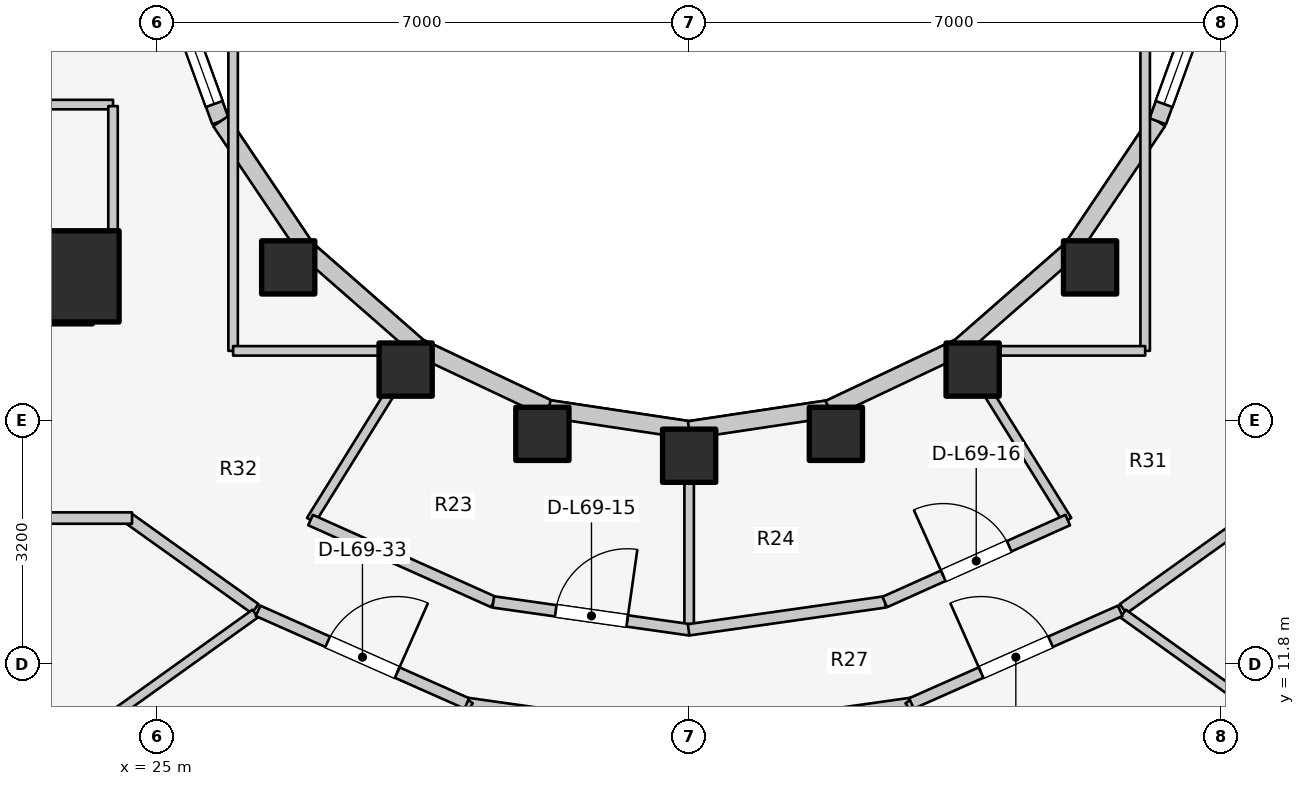
"""IFC4 building model, lengths in metres.
Left out: names, types, materials, properties, quantities, classifications, styles, units other than length and angle.
Written with IfcOpenShell. Run it as: python <this file> out.ifc"""

import sys

from ifc_helpers import new_model, si_unit, direction, frame, frame_2d, origin, origin_2d, place, context, subcontext, project, spatial, rectangle, extrude, element, fill, save


model = new_model("IFC4")
c1 = context("Model", 3, precision=1e-05, world=origin(), true_north=direction((0.0, 1.0)))
c2 = subcontext(c1, "Body", "Model", "MODEL_VIEW")
j1 = project(units=[si_unit("LENGTHUNIT", "METRE"), si_unit("PLANEANGLEUNIT", "RADIAN")], contexts=[c1])
p1 = place(None, origin())
s1 = spatial("IfcSite", under=j1, at=p1, CompositionType="ELEMENT")
p2 = place(p1, origin())
s2 = spatial("IfcBuilding", under=s1, at=p2, CompositionType="ELEMENT")
p3 = place(p2, frame((0.0, 0.0, 226.4)))
s3 = spatial("IfcBuildingStorey", under=s2, at=p3, CompositionType="ELEMENT", Elevation=226.4)
p4 = place(p3, frame((19.65, 16.55, 0.0), z_axis=(0.0, 0.0, 1.0), x_axis=(1.0, 0.0, 0.0)))
e1 = element("IfcWall", 1, at=p4, inside=s3, PredefinedType="SHEAR", context=c2, shape_type="SweptSolid", body=[
    extrude(rectangle(XDim=4.5, YDim=0.55, at=frame_2d((2.25, 0.0))), origin(), (0.0, 0.0, 1.0), 3.1),
])
p5 = place(p3, frame((23.9, 16.9, 0.0), z_axis=(0.0, 0.0, 1.0), x_axis=(1.0, 0.0, 0.0)))
e2 = element("IfcColumn", 2, at=p5, inside=s3, PredefinedType="COLUMN", context=c2, shape_type="SweptSolid", body=[
    extrude(rectangle(XDim=1.2, YDim=1.2, at=origin_2d()), origin(), (0.0, 0.0, 1.0), 3.1),
])
for number, where, z_axis, x_axis in (
    (3, (26.725, 17.018, 0.0), (0.0, 0.0, 1.0), (1.0, 0.0, 0.0)),
    (4, (28.27, 15.673, 0.0), (0.0, 0.0, 1.0), (1.0, 0.0, 0.0)),
    (5, (30.069, 14.828, 0.0), (0.0, 0.0, 1.0), (1.0, 0.0, 0.0)),
    (6, (32.0, 14.54, 0.0), (0.0, 0.0, 1.0), (1.0, 0.0, 0.0)),
    (7, (33.931, 14.828, 0.0), (0.0, 0.0, 1.0), (1.0, 0.0, 0.0)),
    (8, (35.73, 15.673, 0.0), (0.0, 0.0, 1.0), (1.0, 0.0, 0.0)),
    (9, (37.275, 17.018, 0.0), (0.0, 0.0, 1.0), (1.0, 0.0, 0.0)),
):
    element("IfcColumn", number, at=place(p3, frame(where, z_axis=z_axis, x_axis=x_axis)), inside=s3, PredefinedType="COLUMN", context=c2, shape_type="SweptSolid", body=[
        extrude(rectangle(XDim=0.7, YDim=0.7, at=origin_2d()), origin(), (0.0, 0.0, 1.0), 3.1),
    ])
p6 = place(p3, frame((25.123, 20.898, 0.0), z_axis=(0.0, 0.0, 1.0), x_axis=(0.341423187295, -0.93990968033, 0.0)))
e10 = element("IfcWall", 10, at=p6, inside=s3, PredefinedType="STANDARD", context=c2, shape_type="SweptSolid", body=[
    extrude(rectangle(XDim=2.084, YDim=0.23, at=frame_2d((1.042, 0.0))), origin(), (0.0, 0.0, 1.0), 2.84),
])
p7 = place(p6, frame((0.242, 0.0, 0.85)))
e11 = element("IfcOpeningElement", 11, at=p7, cuts=e10, PredefinedType="OPENING", context=c2, shape_type="SweptSolid", body=[
    extrude(rectangle(XDim=1.6, YDim=1.65, at=frame_2d((0.8, 0.825))), frame((0.0, 0.125, 0.0), z_axis=(0.0, -1.0, 0.0), x_axis=(1.0, 0.0, 0.0)), (0.0, 0.0, 1.0), 0.25),
])
p8 = place(p3, frame((25.834, 18.94, 0.0), z_axis=(0.0, 0.0, 1.0), x_axis=(0.558197800898, -0.829707909492, 0.0)))
e12 = element("IfcWall", 12, at=p8, inside=s3, PredefinedType="STANDARD", context=c2, shape_type="SweptSolid", body=[
    extrude(rectangle(XDim=2.027, YDim=0.23, at=frame_2d((1.013, 0.0))), origin(), (0.0, 0.0, 1.0), 2.16),
])
p9 = place(p3, frame((26.965, 17.258, 0.0), z_axis=(0.0, 0.0, 1.0), x_axis=(0.752576694707, -0.658504607869, 0.0)))
e13 = element("IfcWall", 13, at=p9, inside=s3, PredefinedType="STANDARD", context=c2, shape_type="SweptSolid", body=[
    extrude(rectangle(XDim=1.959, YDim=0.23, at=frame_2d((0.98, 0.0))), origin(), (0.0, 0.0, 1.0), 2.16),
])
p10 = place(p3, frame((28.44, 15.968, 0.0), z_axis=(0.0, 0.0, 1.0), x_axis=(0.904179699603, -0.427152280606, 0.0)))
e14 = element("IfcWall", 14, at=p10, inside=s3, PredefinedType="STANDARD", context=c2, shape_type="SweptSolid", body=[
    extrude(rectangle(XDim=1.899, YDim=0.23, at=frame_2d((0.95, 0.0))), origin(), (0.0, 0.0, 1.0), 2.16),
])
for number, where, z_axis, x_axis in (
    (15, (30.157, 15.157, 0.0), (0.0, 0.0, 1.0), (0.989, -0.149, 0.0)),
    (16, (32.0, 14.88, 0.0), (0.0, 0.0, 1.0), (0.989, 0.149, 0.0)),
):
    element("IfcWall", number, at=place(p3, frame(where, z_axis=z_axis, x_axis=x_axis)), inside=s3, PredefinedType="STANDARD", context=c2, shape_type="SweptSolid", body=[
        extrude(rectangle(XDim=1.864, YDim=0.23, at=frame_2d((0.932, 0.0))), origin(), (0.0, 0.0, 1.0), 2.16),
    ])
p11 = place(p3, frame((33.843, 15.157, 0.0), z_axis=(0.0, 0.0, 1.0), x_axis=(0.904179699603, 0.427152280606, 0.0)))
e17 = element("IfcWall", 17, at=p11, inside=s3, PredefinedType="STANDARD", context=c2, shape_type="SweptSolid", body=[
    extrude(rectangle(XDim=1.899, YDim=0.23, at=frame_2d((0.95, 0.0))), origin(), (0.0, 0.0, 1.0), 2.16),
])
p12 = place(p3, frame((35.56, 15.968, 0.0), z_axis=(0.0, 0.0, 1.0), x_axis=(0.752576694707, 0.658504607869, 0.0)))
e18 = element("IfcWall", 18, at=p12, inside=s3, PredefinedType="STANDARD", context=c2, shape_type="SweptSolid", body=[
    extrude(rectangle(XDim=1.959, YDim=0.23, at=frame_2d((0.98, 0.0))), origin(), (0.0, 0.0, 1.0), 2.16),
])
p13 = place(p3, frame((37.035, 17.258, 0.0), z_axis=(0.0, 0.0, 1.0), x_axis=(0.558197800898, 0.829707909492, 0.0)))
e19 = element("IfcWall", 19, at=p13, inside=s3, PredefinedType="STANDARD", context=c2, shape_type="SweptSolid", body=[
    extrude(rectangle(XDim=2.027, YDim=0.23, at=frame_2d((1.013, 0.0))), origin(), (0.0, 0.0, 1.0), 2.16),
])
p14 = place(p3, frame((38.166, 18.94, 0.0), z_axis=(0.0, 0.0, 1.0), x_axis=(0.341423187295, 0.93990968033, 0.0)))
e20 = element("IfcWall", 20, at=p14, inside=s3, PredefinedType="STANDARD", context=c2, shape_type="SweptSolid", body=[
    extrude(rectangle(XDim=2.084, YDim=0.23, at=frame_2d((1.042, 0.0))), origin(), (0.0, 0.0, 1.0), 2.84),
])
p15 = place(p14, frame((0.242, 0.0, 0.85)))
e21 = element("IfcOpeningElement", 21, at=p15, cuts=e20, PredefinedType="OPENING", context=c2, shape_type="SweptSolid", body=[
    extrude(rectangle(XDim=1.6, YDim=1.65, at=frame_2d((0.8, 0.825))), frame((0.0, 0.125, 0.0), z_axis=(0.0, -1.0, 0.0), x_axis=(1.0, 0.0, 0.0)), (0.0, 0.0, 1.0), 0.25),
])
p16 = place(p3, frame((19.55, 19.16, 0.0), z_axis=(0.0, 0.0, 1.0), x_axis=(1.0, 0.0, 0.0)))
e22 = element("IfcWall", 22, at=p16, inside=s3, PredefinedType="PARTITIONING", context=c2, shape_type="SweptSolid", body=[
    extrude(rectangle(XDim=4.87, YDim=0.125, at=frame_2d((2.435, 0.0))), origin(), (0.0, 0.0, 1.0), 2.12),
])
p17 = place(p16, frame((2.272, 0.0, 0.0)))
e23 = element("IfcOpeningElement", 23, at=p17, cuts=e22, PredefinedType="OPENING", context=c2, shape_type="SweptSolid", body=[
    extrude(rectangle(XDim=0.85, YDim=2.05, at=frame_2d((0.425, 1.025))), frame((0.0, 0.073, 0.0), z_axis=(0.0, -1.0, 0.0), x_axis=(1.0, 0.0, 0.0)), (0.0, 0.0, 1.0), 0.145),
])
p18 = place(p3, frame((24.42, 17.1, 0.0), z_axis=(0.0, 0.0, 1.0), x_axis=(0.0, 1.0, 0.0)))
e24 = element("IfcWall", 24, at=p18, inside=s3, PredefinedType="PARTITIONING", context=c2, shape_type="SweptSolid", body=[
    extrude(rectangle(XDim=2.04, YDim=0.125, at=frame_2d((1.02, 0.0))), origin(), (0.0, 0.0, 1.0), 2.232),
])
p19 = place(p3, frame((28.45, 15.985, 0.0), z_axis=(0.0, 0.0, 1.0), x_axis=(-0.527527080983, -0.849538215049, 0.0)))
e25 = element("IfcWall", 25, at=p19, inside=s3, PredefinedType="PARTITIONING", context=c2, shape_type="SweptSolid", body=[
    extrude(rectangle(XDim=2.701, YDim=0.125, at=frame_2d((1.351, 0.0))), origin(), (0.0, 0.0, 1.0), 2.376),
])
p20 = place(p3, frame((32.0, 14.9, 0.0), z_axis=(0.0, 0.0, 1.0), x_axis=(0.0, -1.0, 0.0)))
e26 = element("IfcWall", 26, at=p20, inside=s3, PredefinedType="PARTITIONING", context=c2, shape_type="SweptSolid", body=[
    extrude(rectangle(XDim=2.65, YDim=0.125, at=frame_2d((1.325, 0.0))), origin(), (0.0, 0.0, 1.0), 2.376),
])
p21 = place(p3, frame((35.55, 15.985, 0.0), z_axis=(0.0, 0.0, 1.0), x_axis=(0.527527080983, -0.849538215049, 0.0)))
e27 = element("IfcWall", 27, at=p21, inside=s3, PredefinedType="PARTITIONING", context=c2, shape_type="SweptSolid", body=[
    extrude(rectangle(XDim=2.701, YDim=0.125, at=frame_2d((1.351, 0.0))), origin(), (0.0, 0.0, 1.0), 2.376),
])
p22 = place(p3, frame((27.019, 13.694, 0.0), z_axis=(0.0, 0.0, 1.0), x_axis=(0.912628408652, -0.408790151203, 0.0)))
e28 = element("IfcWall", 28, at=p22, inside=s3, PredefinedType="PARTITIONING", context=c2, shape_type="SweptSolid", body=[
    extrude(rectangle(XDim=2.638, YDim=0.15, at=frame_2d((1.319, 0.0))), origin(), (0.0, 0.0, 1.0), 2.376),
])
p23 = place(p3, frame((29.423, 12.617, 0.0), z_axis=(0.0, 0.0, 1.0), x_axis=(0.990078185178, -0.140517569133, 0.0)))
e29 = element("IfcWall", 29, at=p23, inside=s3, PredefinedType="PARTITIONING", context=c2, shape_type="SweptSolid", body=[
    extrude(rectangle(XDim=2.61, YDim=0.15, at=frame_2d((1.305, 0.0))), origin(), (0.0, 0.0, 1.0), 2.376),
])
p24 = place(p23, frame((0.83, 0.0, 0.0)))
e30 = element("IfcOpeningElement", 30, at=p24, cuts=e29, PredefinedType="OPENING", context=c2, shape_type="SweptSolid", body=[
    extrude(rectangle(XDim=0.95, YDim=2.1, at=frame_2d((0.475, 1.05))), frame((0.0, 0.085, 0.0), z_axis=(0.0, -1.0, 0.0), x_axis=(1.0, 0.0, 0.0)), (0.0, 0.0, 1.0), 0.17),
])
p25 = place(p3, frame((31.993, 12.25, 0.0), z_axis=(0.0, 0.0, 1.0), x_axis=(0.990078185178, 0.140517569133, 0.0)))
e31 = element("IfcWall", 31, at=p25, inside=s3, PredefinedType="PARTITIONING", context=c2, shape_type="SweptSolid", body=[
    extrude(rectangle(XDim=2.61, YDim=0.15, at=frame_2d((1.305, 0.0))), origin(), (0.0, 0.0, 1.0), 2.376),
])
p26 = place(p3, frame((34.573, 12.616, 0.0), z_axis=(0.0, 0.0, 1.0), x_axis=(0.912628408652, 0.408790151203, 0.0)))
e32 = element("IfcWall", 32, at=p26, inside=s3, PredefinedType="PARTITIONING", context=c2, shape_type="SweptSolid", body=[
    extrude(rectangle(XDim=2.638, YDim=0.15, at=frame_2d((1.319, 0.0))), origin(), (0.0, 0.0, 1.0), 2.376),
])
p27 = place(p26, frame((0.844, 0.0, 0.0)))
e33 = element("IfcOpeningElement", 33, at=p27, cuts=e32, PredefinedType="OPENING", context=c2, shape_type="SweptSolid", body=[
    extrude(rectangle(XDim=0.95, YDim=2.1, at=frame_2d((0.475, 1.05))), frame((0.0, 0.085, 0.0), z_axis=(0.0, -1.0, 0.0), x_axis=(1.0, 0.0, 0.0)), (0.0, 0.0, 1.0), 0.17),
])
p28 = place(p3, frame((26.0, 15.92, 0.0), z_axis=(0.0, 0.0, 1.0), x_axis=(0.0, 1.0, 0.0)))
e34 = element("IfcWall", 34, at=p28, inside=s3, PredefinedType="PARTITIONING", context=c2, shape_type="SweptSolid", body=[
    extrude(rectangle(XDim=4.28, YDim=0.125, at=frame_2d((2.14, 0.0))), origin(), (0.0, 0.0, 1.0), 2.232),
])
p29 = place(p3, frame((26.0, 15.92, 0.0), z_axis=(0.0, 0.0, 1.0), x_axis=(1.0, 0.0, 0.0)))
e35 = element("IfcWall", 35, at=p29, inside=s3, PredefinedType="PARTITIONING", context=c2, shape_type="SweptSolid", body=[
    extrude(rectangle(XDim=2.6, YDim=0.125, at=frame_2d((1.3, 0.0))), origin(), (0.0, 0.0, 1.0), 2.232),
])
p30 = place(p3, frame((38.0, 15.92, 0.0), z_axis=(0.0, 0.0, 1.0), x_axis=(0.0, 1.0, 0.0)))
e36 = element("IfcWall", 36, at=p30, inside=s3, PredefinedType="PARTITIONING", context=c2, shape_type="SweptSolid", body=[
    extrude(rectangle(XDim=4.28, YDim=0.125, at=frame_2d((2.14, 0.0))), origin(), (0.0, 0.0, 1.0), 2.232),
])
p31 = place(p3, frame((35.4, 15.92, 0.0), z_axis=(0.0, 0.0, 1.0), x_axis=(1.0, 0.0, 0.0)))
e37 = element("IfcWall", 37, at=p31, inside=s3, PredefinedType="PARTITIONING", context=c2, shape_type="SweptSolid", body=[
    extrude(rectangle(XDim=2.6, YDim=0.125, at=frame_2d((1.3, 0.0))), origin(), (0.0, 0.0, 1.0), 2.232),
])
p32 = place(p3, frame((26.29, 12.527, 0.0), z_axis=(0.0, 0.0, 1.0), x_axis=(-0.813780999276, 0.581171648669, 0.0)))
e38 = element("IfcWall", 38, at=p32, inside=s3, PredefinedType="PARTITIONING", context=c2, shape_type="SweptSolid", body=[
    extrude(rectangle(XDim=2.082, YDim=0.15, at=frame_2d((1.041, 0.0))), origin(), (0.0, 0.0, 1.0), 2.376),
])
p33 = place(p3, frame((17.15, 13.72, 0.0), z_axis=(0.0, 0.0, 1.0), x_axis=(1.0, 0.0, 0.0)))
e39 = element("IfcWall", 39, at=p33, inside=s3, PredefinedType="PARTITIONING", context=c2, shape_type="SweptSolid", body=[
    extrude(rectangle(XDim=7.52, YDim=0.15, at=frame_2d((3.76, 0.0))), origin(), (0.0, 0.0, 1.0), 2.376),
])
p34 = place(p33, frame((1.3, 0.0, 0.0)))
e40 = element("IfcOpeningElement", 40, at=p34, cuts=e39, PredefinedType="OPENING", context=c2, shape_type="SweptSolid", body=[
    extrude(rectangle(XDim=0.9, YDim=2.1, at=frame_2d((0.45, 1.05))), frame((0.0, 0.085, 0.0), z_axis=(0.0, -1.0, 0.0), x_axis=(1.0, 0.0, 0.0)), (0.0, 0.0, 1.0), 0.17),
])
p35 = place(p3, frame((37.71, 12.527, 0.0), z_axis=(0.0, 0.0, 1.0), x_axis=(0.813780999276, 0.581171648669, 0.0)))
e41 = element("IfcWall", 41, at=p35, inside=s3, PredefinedType="PARTITIONING", context=c2, shape_type="SweptSolid", body=[
    extrude(rectangle(XDim=2.082, YDim=0.15, at=frame_2d((1.041, 0.0))), origin(), (0.0, 0.0, 1.0), 2.376),
])
for number, where, z_axis, x_axis in (
    (42, (26.29, 12.463, 0.0), (0.0, 0.0, 1.0), (-0.813, -0.582, 0.0)),
    (43, (37.71, 12.463, 0.0), (0.0, 0.0, 1.0), (0.813, -0.582, 0.0)),
):
    element("IfcWall", number, at=place(p3, frame(where, z_axis=z_axis, x_axis=x_axis)), inside=s3, PredefinedType="PARTITIONING", context=c2, shape_type="SweptSolid", body=[
        extrude(rectangle(XDim=6.955, YDim=0.125, at=frame_2d((3.477, 0.0))), origin(), (0.0, 0.0, 1.0), 2.376),
    ])
p36 = place(p3, frame((29.018, 11.29, 0.0), z_axis=(0.0, 0.0, 1.0), x_axis=(0.990214091671, -0.13955662885, 0.0)))
e44 = element("IfcWall", 44, at=p36, inside=s3, PredefinedType="PARTITIONING", context=c2, shape_type="SweptSolid", body=[
    extrude(rectangle(XDim=3.062, YDim=0.15, at=frame_2d((1.531, 0.0))), origin(), (0.0, 0.0, 1.0), 2.376),
])
p37 = place(p3, frame((29.097, 11.324, 0.0), z_axis=(0.0, 0.0, 1.0), x_axis=(-0.583259891741, -0.812285601673, 0.0)))
e45 = element("IfcWall", 45, at=p37, inside=s3, PredefinedType="PLUMBINGWALL", context=c2, shape_type="SweptSolid", body=[
    extrude(rectangle(XDim=2.1, YDim=0.14, at=frame_2d((1.05, 0.0))), origin(), (0.0, 0.0, 1.0), 2.385),
])
p38 = place(p3, frame((26.328, 12.499, 0.0), z_axis=(0.0, 0.0, 1.0), x_axis=(0.914139569865, -0.405399613724, 0.0)))
e46 = element("IfcWall", 46, at=p38, inside=s3, PredefinedType="PARTITIONING", context=c2, shape_type="SweptSolid", body=[
    extrude(rectangle(XDim=3.005, YDim=0.15, at=frame_2d((1.502, 0.0))), origin(), (0.0, 0.0, 1.0), 2.376),
])
p39 = place(p38, frame((1.002, 0.0, 0.0)))
e47 = element("IfcOpeningElement", 47, at=p39, cuts=e46, PredefinedType="OPENING", context=c2, shape_type="SweptSolid", body=[
    extrude(rectangle(XDim=1.0, YDim=2.1, at=frame_2d((0.5, 1.05))), frame((0.0, 0.085, 0.0), z_axis=(0.0, -1.0, 0.0), x_axis=(1.0, 0.0, 0.0)), (0.0, 0.0, 1.0), 0.17),
])
p40 = place(p3, frame((31.95, 10.863, 0.0), z_axis=(0.0, 0.0, 1.0), x_axis=(0.990214091671, 0.13955662885, 0.0)))
e48 = element("IfcWall", 48, at=p40, inside=s3, PredefinedType="PARTITIONING", context=c2, shape_type="SweptSolid", body=[
    extrude(rectangle(XDim=3.062, YDim=0.15, at=frame_2d((1.531, 0.0))), origin(), (0.0, 0.0, 1.0), 2.376),
])
p41 = place(p3, frame((34.903, 11.324, 0.0), z_axis=(0.0, 0.0, 1.0), x_axis=(0.583259891741, -0.812285601673, 0.0)))
e49 = element("IfcWall", 49, at=p41, inside=s3, PredefinedType="PLUMBINGWALL", context=c2, shape_type="SweptSolid", body=[
    extrude(rectangle(XDim=2.1, YDim=0.14, at=frame_2d((1.05, 0.0))), origin(), (0.0, 0.0, 1.0), 2.385),
])
p42 = place(p3, frame((34.925, 11.281, 0.0), z_axis=(0.0, 0.0, 1.0), x_axis=(0.914139569865, 0.405399613724, 0.0)))
e50 = element("IfcWall", 50, at=p42, inside=s3, PredefinedType="PARTITIONING", context=c2, shape_type="SweptSolid", body=[
    extrude(rectangle(XDim=3.005, YDim=0.15, at=frame_2d((1.502, 0.0))), origin(), (0.0, 0.0, 1.0), 2.376),
])
p43 = place(p42, frame((1.002, 0.0, 0.0)))
e51 = element("IfcOpeningElement", 51, at=p43, cuts=e50, PredefinedType="OPENING", context=c2, shape_type="SweptSolid", body=[
    extrude(rectangle(XDim=1.0, YDim=2.1, at=frame_2d((0.5, 1.05))), frame((0.0, 0.085, 0.0), z_axis=(0.0, -1.0, 0.0), x_axis=(1.0, 0.0, 0.0)), (0.0, 0.0, 1.0), 0.17),
])
p44 = place(p7, origin())
e52 = element("IfcWindow", 52, at=p44, inside=s3, PartitioningType="SINGLE_PANEL", PredefinedType="WINDOW", context=c2, shape_type="SweptSolid", body=[
    extrude(rectangle(XDim=1.6, YDim=1.65, at=frame_2d((0.8, 0.825))), frame((0.0, 0.03, 0.0), z_axis=(0.0, -1.0, 0.0), x_axis=(1.0, 0.0, 0.0)), (0.0, 0.0, 1.0), 0.06),
])
fill(e11, e52)
p45 = place(p15, origin())
e53 = element("IfcWindow", 53, at=p45, inside=s3, PartitioningType="SINGLE_PANEL", PredefinedType="WINDOW", context=c2, shape_type="SweptSolid", body=[
    extrude(rectangle(XDim=1.6, YDim=1.65, at=frame_2d((0.8, 0.825))), frame((0.0, 0.03, 0.0), z_axis=(0.0, -1.0, 0.0), x_axis=(1.0, 0.0, 0.0)), (0.0, 0.0, 1.0), 0.06),
])
fill(e21, e53)
p46 = place(p24, origin())
e54 = element("IfcDoor", 54, at=p46, inside=s3, OperationType="SINGLE_SWING_RIGHT", PredefinedType="DOOR", context=c2, shape_type="SweptSolid", body=[
    extrude(rectangle(XDim=0.95, YDim=2.1, at=frame_2d((0.475, 1.05))), frame((0.0, 0.025, 0.0), z_axis=(0.0, -1.0, 0.0), x_axis=(1.0, 0.0, 0.0)), (0.0, 0.0, 1.0), 0.05),
])
fill(e30, e54)
p47 = place(p27, origin())
e55 = element("IfcDoor", 55, at=p47, inside=s3, OperationType="SINGLE_SWING_LEFT", PredefinedType="DOOR", context=c2, shape_type="SweptSolid", body=[
    extrude(rectangle(XDim=0.95, YDim=2.1, at=frame_2d((0.475, 1.05))), frame((0.0, 0.025, 0.0), z_axis=(0.0, -1.0, 0.0), x_axis=(1.0, 0.0, 0.0)), (0.0, 0.0, 1.0), 0.05),
])
fill(e33, e55)
p48 = place(p39, origin())
e56 = element("IfcDoor", 56, at=p48, inside=s3, OperationType="SINGLE_SWING_RIGHT", PredefinedType="DOOR", context=c2, shape_type="SweptSolid", body=[
    extrude(rectangle(XDim=1.0, YDim=2.1, at=frame_2d((0.5, 1.05))), frame((0.0, 0.025, 0.0), z_axis=(0.0, -1.0, 0.0), x_axis=(1.0, 0.0, 0.0)), (0.0, 0.0, 1.0), 0.05),
])
fill(e47, e56)
p49 = place(p43, origin())
e57 = element("IfcDoor", 57, at=p49, inside=s3, OperationType="SINGLE_SWING_LEFT", PredefinedType="DOOR", context=c2, shape_type="SweptSolid", body=[
    extrude(rectangle(XDim=1.0, YDim=2.1, at=frame_2d((0.5, 1.05))), frame((0.0, 0.025, 0.0), z_axis=(0.0, -1.0, 0.0), x_axis=(1.0, 0.0, 0.0)), (0.0, 0.0, 1.0), 0.05),
])
fill(e51, e57)
save(model, sys.argv[1])
